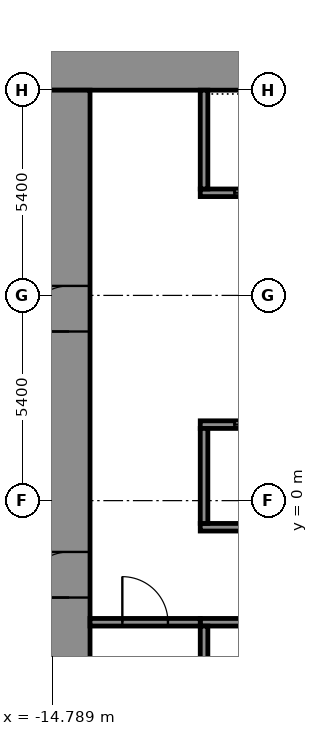
"""IFC4 building model, lengths in metres.
Left out: names, types, materials, properties, quantities, classifications, styles, units other than length and angle.
Written with IfcOpenShell. Run it as: python <this file> out.ifc"""

import sys

from ifc_helpers import new_model, si_unit, direction, frame, frame_2d, origin, place, context, subcontext, project, spatial, rectangle, extrude, element, fill, save


model = new_model("IFC4")
c1 = context("Model", 3, precision=1e-05, world=origin(), true_north=direction((0.0, 1.0)))
c2 = subcontext(c1, "Body", "Model", "MODEL_VIEW")
j1 = project(units=[si_unit("LENGTHUNIT", "METRE"), si_unit("PLANEANGLEUNIT", "RADIAN")], contexts=[c1])
p1 = place(None, origin())
s1 = spatial("IfcSite", under=j1, at=p1, CompositionType="ELEMENT")
p2 = place(p1, origin())
s2 = spatial("IfcBuilding", under=s1, at=p2, CompositionType="ELEMENT")
p3 = place(p2, frame((0.0, 0.0, 67.5)))
s3 = spatial("IfcBuildingStorey", under=s2, at=p3, CompositionType="ELEMENT", Elevation=67.5)
p4 = place(p3, frame((-14.9, 11.35, 0.0), z_axis=(0.0, 0.0, 1.0), x_axis=(1.0, 0.0, 0.0)))
e1 = element("IfcWall", 1, at=p4, inside=s3, PredefinedType="SHEAR", context=c2, shape_type="SweptSolid", body=[
    extrude(rectangle(XDim=29.8, YDim=1.1, at=frame_2d((14.9, 0.0))), origin(), (0.0, 0.0, 1.0), 3.6),
])
p5 = place(p3, frame((-14.35, -10.8, 0.0), z_axis=(0.0, 0.0, 1.0), x_axis=(0.0, 1.0, 0.0)))
e2 = element("IfcWall", 2, at=p5, inside=s3, PredefinedType="SHEAR", context=c2, shape_type="SweptSolid", body=[
    extrude(rectangle(XDim=21.6, YDim=1.1, at=frame_2d((10.8, 0.0))), origin(), (0.0, 0.0, 1.0), 3.6),
])
p6 = place(p5, frame((8.25, 0.0, 0.0)))
e3 = element("IfcOpeningElement", 3, at=p6, cuts=e2, PredefinedType="OPENING", context=c2, shape_type="SweptSolid", body=[
    extrude(rectangle(XDim=1.2, YDim=2.1, at=frame_2d((0.6, 1.05))), frame((0.0, 0.56, 0.0), z_axis=(0.0, -1.0, 0.0), x_axis=(1.0, 0.0, 0.0)), (0.0, 0.0, 1.0), 1.12),
])
p7 = place(p5, frame((15.25, 0.0, 0.0)))
e4 = element("IfcOpeningElement", 4, at=p7, cuts=e2, PredefinedType="OPENING", context=c2, shape_type="SweptSolid", body=[
    extrude(rectangle(XDim=1.2, YDim=2.1, at=frame_2d((0.6, 1.05))), frame((0.0, 0.56, 0.0), z_axis=(0.0, -1.0, 0.0), x_axis=(1.0, 0.0, 0.0)), (0.0, 0.0, 1.0), 1.12),
])
p8 = place(p3, frame((-10.9, -3.2, 0.0), z_axis=(0.0, 0.0, 1.0), x_axis=(1.0, 0.0, 0.0)))
e5 = element("IfcWall", 5, at=p8, inside=s3, PredefinedType="SHEAR", context=c2, shape_type="SweptSolid", body=[
    extrude(rectangle(XDim=21.8, YDim=0.2, at=frame_2d((10.9, 0.0))), origin(), (0.0, 0.0, 1.0), 3.05),
])
p9 = place(p8, frame((1.075, 0.0, 0.0)))
e6 = element("IfcOpeningElement", 6, at=p9, cuts=e5, PredefinedType="OPENING", context=c2, shape_type="SweptSolid", body=[
    extrude(rectangle(XDim=1.1, YDim=2.1, at=frame_2d((0.55, 1.05))), frame((0.0, 0.11, 0.0), z_axis=(0.0, -1.0, 0.0), x_axis=(1.0, 0.0, 0.0)), (0.0, 0.0, 1.0), 0.22),
])
p10 = place(p8, frame((10.325, 0.0, 0.0)))
e7 = element("IfcOpeningElement", 7, at=p10, cuts=e5, PredefinedType="OPENING", context=c2, shape_type="SweptSolid", body=[
    extrude(rectangle(XDim=1.1, YDim=2.1, at=frame_2d((0.55, 1.05))), frame((0.0, 0.11, 0.0), z_axis=(0.0, -1.0, 0.0), x_axis=(1.0, 0.0, 0.0)), (0.0, 0.0, 1.0), 0.22),
])
p11 = place(p8, frame((19.625, 0.0, 0.0)))
e8 = element("IfcOpeningElement", 8, at=p11, cuts=e5, PredefinedType="OPENING", context=c2, shape_type="SweptSolid", body=[
    extrude(rectangle(XDim=1.1, YDim=2.1, at=frame_2d((0.55, 1.05))), frame((0.0, 0.11, 0.0), z_axis=(0.0, -1.0, 0.0), x_axis=(1.0, 0.0, 0.0)), (0.0, 0.0, 1.0), 0.22),
])
p12 = place(p8, frame((5.7, 0.0, 0.0)))
e9 = element("IfcOpeningElement", 9, at=p12, cuts=e5, PredefinedType="OPENING", context=c2, shape_type="SweptSolid", body=[
    extrude(rectangle(XDim=1.1, YDim=2.1, at=frame_2d((0.55, 1.05))), frame((0.0, 0.11, 0.0), z_axis=(0.0, -1.0, 0.0), x_axis=(1.0, 0.0, 0.0)), (0.0, 0.0, 1.0), 0.22),
])
p13 = place(p8, frame((14.975, 0.0, 0.0)))
e10 = element("IfcOpeningElement", 10, at=p13, cuts=e5, PredefinedType="OPENING", context=c2, shape_type="SweptSolid", body=[
    extrude(rectangle(XDim=1.1, YDim=2.1, at=frame_2d((0.55, 1.05))), frame((0.0, 0.11, 0.0), z_axis=(0.0, -1.0, 0.0), x_axis=(1.0, 0.0, 0.0)), (0.0, 0.0, 1.0), 0.22),
])
p14 = place(p3, frame((-10.9, -0.7, 0.0), z_axis=(0.0, 0.0, 1.0), x_axis=(1.0, 0.0, 0.0)))
e11 = element("IfcWall", 11, at=p14, inside=s3, PredefinedType="SHEAR", context=c2, shape_type="SweptSolid", body=[
    extrude(rectangle(XDim=21.8, YDim=0.2, at=frame_2d((10.9, 0.0))), origin(), (0.0, 0.0, 1.0), 3.05),
])
p15 = place(p3, frame((-10.9, 2.0, 0.0), z_axis=(0.0, 0.0, 1.0), x_axis=(1.0, 0.0, 0.0)))
e12 = element("IfcWall", 12, at=p15, inside=s3, PredefinedType="SHEAR", context=c2, shape_type="SweptSolid", body=[
    extrude(rectangle(XDim=21.8, YDim=0.2, at=frame_2d((10.9, 0.0))), origin(), (0.0, 0.0, 1.0), 3.05),
])
p16 = place(p15, frame((0.9, 0.0, 0.0)))
e13 = element("IfcOpeningElement", 13, at=p16, cuts=e12, PredefinedType="OPENING", context=c2, shape_type="SweptSolid", body=[
    extrude(rectangle(XDim=1.1, YDim=2.1, at=frame_2d((0.55, 1.05))), frame((0.0, 0.11, 0.0), z_axis=(0.0, -1.0, 0.0), x_axis=(1.0, 0.0, 0.0)), (0.0, 0.0, 1.0), 0.22),
])
p17 = place(p15, frame((3.6, 0.0, 0.0)))
e14 = element("IfcOpeningElement", 14, at=p17, cuts=e12, PredefinedType="OPENING", context=c2, shape_type="SweptSolid", body=[
    extrude(rectangle(XDim=1.1, YDim=2.1, at=frame_2d((0.55, 1.05))), frame((0.0, 0.11, 0.0), z_axis=(0.0, -1.0, 0.0), x_axis=(1.0, 0.0, 0.0)), (0.0, 0.0, 1.0), 0.22),
])
p18 = place(p15, frame((6.3, 0.0, 0.0)))
e15 = element("IfcOpeningElement", 15, at=p18, cuts=e12, PredefinedType="OPENING", context=c2, shape_type="SweptSolid", body=[
    extrude(rectangle(XDim=1.1, YDim=2.1, at=frame_2d((0.55, 1.05))), frame((0.0, 0.11, 0.0), z_axis=(0.0, -1.0, 0.0), x_axis=(1.0, 0.0, 0.0)), (0.0, 0.0, 1.0), 0.22),
])
p19 = place(p15, frame((9.0, 0.0, 0.0)))
e16 = element("IfcOpeningElement", 16, at=p19, cuts=e12, PredefinedType="OPENING", context=c2, shape_type="SweptSolid", body=[
    extrude(rectangle(XDim=1.1, YDim=2.1, at=frame_2d((0.55, 1.05))), frame((0.0, 0.11, 0.0), z_axis=(0.0, -1.0, 0.0), x_axis=(1.0, 0.0, 0.0)), (0.0, 0.0, 1.0), 0.22),
])
p20 = place(p15, frame((11.7, 0.0, 0.0)))
e17 = element("IfcOpeningElement", 17, at=p20, cuts=e12, PredefinedType="OPENING", context=c2, shape_type="SweptSolid", body=[
    extrude(rectangle(XDim=1.1, YDim=2.1, at=frame_2d((0.55, 1.05))), frame((0.0, 0.11, 0.0), z_axis=(0.0, -1.0, 0.0), x_axis=(1.0, 0.0, 0.0)), (0.0, 0.0, 1.0), 0.22),
])
p21 = place(p15, frame((15.85, 0.0, 0.0)))
e18 = element("IfcOpeningElement", 18, at=p21, cuts=e12, PredefinedType="OPENING", context=c2, shape_type="SweptSolid", body=[
    extrude(rectangle(XDim=0.9, YDim=2.1, at=frame_2d((0.45, 1.05))), frame((0.0, 0.11, 0.0), z_axis=(0.0, -1.0, 0.0), x_axis=(1.0, 0.0, 0.0)), (0.0, 0.0, 1.0), 0.22),
])
p22 = place(p15, frame((19.9, 0.0, 0.0)))
e19 = element("IfcOpeningElement", 19, at=p22, cuts=e12, PredefinedType="OPENING", context=c2, shape_type="SweptSolid", body=[
    extrude(rectangle(XDim=0.9, YDim=2.1, at=frame_2d((0.45, 1.05))), frame((0.0, 0.11, 0.0), z_axis=(0.0, -1.0, 0.0), x_axis=(1.0, 0.0, 0.0)), (0.0, 0.0, 1.0), 0.22),
])
p23 = place(p3, frame((-10.9, 8.1, 0.0), z_axis=(0.0, 0.0, 1.0), x_axis=(1.0, 0.0, 0.0)))
e20 = element("IfcWall", 20, at=p23, inside=s3, PredefinedType="SHEAR", context=c2, shape_type="SweptSolid", body=[
    extrude(rectangle(XDim=21.8, YDim=0.2, at=frame_2d((10.9, 0.0))), origin(), (0.0, 0.0, 1.0), 3.05),
])
p24 = place(p23, frame((0.9, 0.0, 0.0)))
e21 = element("IfcOpeningElement", 21, at=p24, cuts=e20, PredefinedType="OPENING", context=c2, shape_type="SweptSolid", body=[
    extrude(rectangle(XDim=1.1, YDim=2.1, at=frame_2d((0.55, 1.05))), frame((0.0, 0.11, 0.0), z_axis=(0.0, -1.0, 0.0), x_axis=(1.0, 0.0, 0.0)), (0.0, 0.0, 1.0), 0.22),
])
p25 = place(p23, frame((3.6, 0.0, 0.0)))
e22 = element("IfcOpeningElement", 22, at=p25, cuts=e20, PredefinedType="OPENING", context=c2, shape_type="SweptSolid", body=[
    extrude(rectangle(XDim=1.1, YDim=2.1, at=frame_2d((0.55, 1.05))), frame((0.0, 0.11, 0.0), z_axis=(0.0, -1.0, 0.0), x_axis=(1.0, 0.0, 0.0)), (0.0, 0.0, 1.0), 0.22),
])
p26 = place(p23, frame((6.3, 0.0, 0.0)))
e23 = element("IfcOpeningElement", 23, at=p26, cuts=e20, PredefinedType="OPENING", context=c2, shape_type="SweptSolid", body=[
    extrude(rectangle(XDim=1.1, YDim=2.1, at=frame_2d((0.55, 1.05))), frame((0.0, 0.11, 0.0), z_axis=(0.0, -1.0, 0.0), x_axis=(1.0, 0.0, 0.0)), (0.0, 0.0, 1.0), 0.22),
])
p27 = place(p23, frame((9.0, 0.0, 0.0)))
e24 = element("IfcOpeningElement", 24, at=p27, cuts=e20, PredefinedType="OPENING", context=c2, shape_type="SweptSolid", body=[
    extrude(rectangle(XDim=1.1, YDim=2.1, at=frame_2d((0.55, 1.05))), frame((0.0, 0.11, 0.0), z_axis=(0.0, -1.0, 0.0), x_axis=(1.0, 0.0, 0.0)), (0.0, 0.0, 1.0), 0.22),
])
p28 = place(p23, frame((11.7, 0.0, 0.0)))
e25 = element("IfcOpeningElement", 25, at=p28, cuts=e20, PredefinedType="OPENING", context=c2, shape_type="SweptSolid", body=[
    extrude(rectangle(XDim=1.1, YDim=2.1, at=frame_2d((0.55, 1.05))), frame((0.0, 0.11, 0.0), z_axis=(0.0, -1.0, 0.0), x_axis=(1.0, 0.0, 0.0)), (0.0, 0.0, 1.0), 0.22),
])
p29 = place(p23, frame((17.2, 0.0, 0.0)))
e26 = element("IfcOpeningElement", 26, at=p29, cuts=e20, PredefinedType="OPENING", context=c2, shape_type="SweptSolid", body=[
    extrude(rectangle(XDim=0.9, YDim=2.1, at=frame_2d((0.45, 1.05))), frame((0.0, 0.11, 0.0), z_axis=(0.0, -1.0, 0.0), x_axis=(1.0, 0.0, 0.0)), (0.0, 0.0, 1.0), 0.22),
])
p30 = place(p3, frame((-10.8, -10.8, 0.0), z_axis=(0.0, 0.0, 1.0), x_axis=(0.0, 1.0, 0.0)))
e27 = element("IfcWall", 27, at=p30, inside=s3, PredefinedType="SHEAR", context=c2, shape_type="SweptSolid", body=[
    extrude(rectangle(XDim=7.5, YDim=0.2, at=frame_2d((3.75, 0.0))), origin(), (0.0, 0.0, 1.0), 3.05),
])
p31 = place(p3, frame((-10.8, -0.6, 0.0), z_axis=(0.0, 0.0, 1.0), x_axis=(0.0, 1.0, 0.0)))
e28 = element("IfcWall", 28, at=p31, inside=s3, PredefinedType="SHEAR", context=c2, shape_type="SweptSolid", body=[
    extrude(rectangle(XDim=2.5, YDim=0.2, at=frame_2d((1.25, 0.0))), origin(), (0.0, 0.0, 1.0), 3.05),
])
p32 = place(p3, frame((-10.8, 8.2, 0.0), z_axis=(0.0, 0.0, 1.0), x_axis=(0.0, 1.0, 0.0)))
e29 = element("IfcWall", 29, at=p32, inside=s3, PredefinedType="SHEAR", context=c2, shape_type="SweptSolid", body=[
    extrude(rectangle(XDim=2.6, YDim=0.2, at=frame_2d((1.3, 0.0))), origin(), (0.0, 0.0, 1.0), 3.05),
])
p33 = place(p3, frame((-13.8, -3.2, 0.0), z_axis=(0.0, 0.0, 1.0), x_axis=(1.0, 0.0, 0.0)))
e30 = element("IfcWall", 30, at=p33, inside=s3, PredefinedType="STANDARD", context=c2, shape_type="SweptSolid", body=[
    extrude(rectangle(XDim=2.9, YDim=0.2, at=frame_2d((1.45, 0.0))), origin(), (0.0, 0.0, 1.0), 3.05),
])
p34 = place(p33, frame((0.85, 0.0, 0.0)))
e31 = element("IfcOpeningElement", 31, at=p34, cuts=e30, PredefinedType="OPENING", context=c2, shape_type="SweptSolid", body=[
    extrude(rectangle(XDim=1.2, YDim=2.1, at=frame_2d((0.6, 1.05))), frame((0.0, 0.11, 0.0), z_axis=(0.0, -1.0, 0.0), x_axis=(1.0, 0.0, 0.0)), (0.0, 0.0, 1.0), 0.22),
])
p35 = place(p6, origin())
e32 = element("IfcDoor", 32, at=p35, inside=s3, OperationType="DOUBLE_DOOR_SINGLE_SWING", PredefinedType="DOOR", context=c2, shape_type="SweptSolid", body=[
    extrude(rectangle(XDim=1.2, YDim=2.1, at=frame_2d((0.6, 1.05))), frame((0.0, 0.025, 0.0), z_axis=(0.0, -1.0, 0.0), x_axis=(1.0, 0.0, 0.0)), (0.0, 0.0, 1.0), 0.05),
])
fill(e3, e32)
p36 = place(p7, origin())
e33 = element("IfcDoor", 33, at=p36, inside=s3, OperationType="DOUBLE_DOOR_SINGLE_SWING", PredefinedType="DOOR", context=c2, shape_type="SweptSolid", body=[
    extrude(rectangle(XDim=1.2, YDim=2.1, at=frame_2d((0.6, 1.05))), frame((0.0, 0.025, 0.0), z_axis=(0.0, -1.0, 0.0), x_axis=(1.0, 0.0, 0.0)), (0.0, 0.0, 1.0), 0.05),
])
fill(e4, e33)
p37 = place(p16, origin())
e34 = element("IfcDoor", 34, at=p37, inside=s3, OperationType="SLIDING_TO_LEFT", PredefinedType="DOOR", context=c2, shape_type="SweptSolid", body=[
    extrude(rectangle(XDim=1.1, YDim=2.1, at=frame_2d((0.55, 1.05))), frame((0.0, 0.025, 0.0), z_axis=(0.0, -1.0, 0.0), x_axis=(1.0, 0.0, 0.0)), (0.0, 0.0, 1.0), 0.05),
])
fill(e13, e34)
p38 = place(p24, origin())
e35 = element("IfcDoor", 35, at=p38, inside=s3, OperationType="SLIDING_TO_LEFT", PredefinedType="DOOR", context=c2, shape_type="SweptSolid", body=[
    extrude(rectangle(XDim=1.1, YDim=2.1, at=frame_2d((0.55, 1.05))), frame((0.0, 0.025, 0.0), z_axis=(0.0, -1.0, 0.0), x_axis=(1.0, 0.0, 0.0)), (0.0, 0.0, 1.0), 0.05),
])
fill(e21, e35)
p39 = place(p34, origin())
e36 = element("IfcDoor", 36, at=p39, inside=s3, OperationType="SINGLE_SWING_LEFT", PredefinedType="DOOR", context=c2, shape_type="SweptSolid", body=[
    extrude(rectangle(XDim=1.2, YDim=2.1, at=frame_2d((0.6, 1.05))), frame((0.0, 0.025, 0.0), z_axis=(0.0, -1.0, 0.0), x_axis=(1.0, 0.0, 0.0)), (0.0, 0.0, 1.0), 0.05),
])
fill(e31, e36)
save(model, sys.argv[1])
